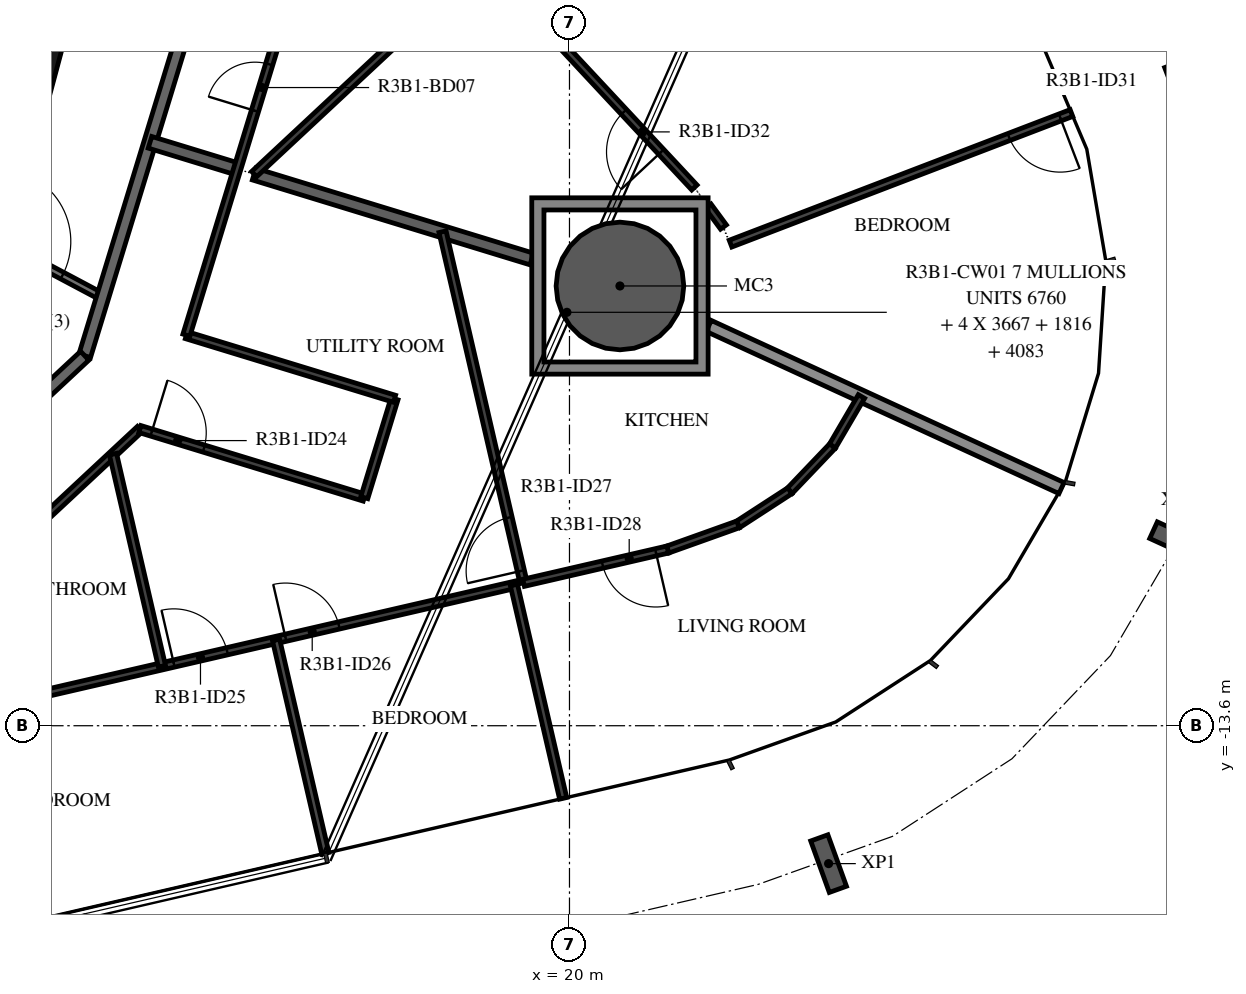
"""IFC4 building model, lengths in metres.
Left out: names, types, materials, properties, quantities, classifications, styles, units other than length and angle.
Written with IfcOpenShell. Run it as: python <this file> out.ifc"""

import sys

from ifc_helpers import new_model, si_unit, direction, frame, frame_2d, origin, origin_2d, place, context, subcontext, project, spatial, polyline, rectangle, hollow_circle, i_section, outline, extrude, element, fill, save


model = new_model("IFC4")
c1 = context("Model", 3, precision=1e-05, world=origin(), true_north=direction((0.0, 1.0)))
c2 = subcontext(c1, "Body", "Model", "MODEL_VIEW")
j1 = project(units=[si_unit("LENGTHUNIT", "METRE"), si_unit("PLANEANGLEUNIT", "RADIAN")], contexts=[c1])
p1 = place(None, origin())
s1 = spatial("IfcSite", under=j1, at=p1, CompositionType="ELEMENT")
p2 = place(p1, origin())
s2 = spatial("IfcBuilding", under=s1, at=p2, CompositionType="ELEMENT")
p3 = place(p2, frame((0.0, 0.0, 123.9)))
s3 = spatial("IfcBuildingStorey", under=s2, at=p3, CompositionType="ELEMENT", Elevation=123.9)
p4 = place(p3, frame((20.83, -6.368, -0.38), z_axis=(0.0, 0.0, 1.0), x_axis=(1.0, 0.0, 0.0)))
e1 = element("IfcColumn", 1, at=p4, inside=s3, PredefinedType="COLUMN", context=c2, shape_type="SweptSolid", body=[
    extrude(hollow_circle(Radius=1.05, WallThickness=0.05, at=origin_2d()), origin(), (0.0, 0.0, 1.0), 3.5),
])
for number, where, z_axis, x_axis in (
    (2, (24.261, -15.868, -0.38), (0.0, 0.0, 1.0), (-0.941, -0.34, 0.0)),
    (3, (30.014, -10.571, -0.38), (0.0, 0.0, 1.0), (-0.416, -0.909, 0.0)),
    (4, (30.262, -2.756, -0.38), (0.0, 0.0, 1.0), (0.358, -0.934, 0.0)),
):
    element("IfcColumn", number, at=place(p3, frame(where, z_axis=z_axis, x_axis=x_axis)), inside=s3, PredefinedType="COLUMN", context=c2, shape_type="SweptSolid", body=[
        extrude(i_section(OverallWidth=0.3, OverallDepth=0.9, WebThickness=0.019, FlangeThickness=0.035, FilletRadius=0.03, at=origin_2d()), origin(), (0.0, 0.0, 1.0), 3.5),
    ])
p5 = place(p3, frame((10.858, -4.479, 0.0), z_axis=(0.0, 0.0, 1.0), x_axis=(0.258734743916, 0.965948410781, 0.0)))
e5 = element("IfcWall", 5, at=p5, inside=s3, PredefinedType="SHEAR", context=c2, shape_type="SweptSolid", body=[
    extrude(rectangle(XDim=3.033, YDim=0.5, at=frame_2d((1.516, 0.0))), origin(), (0.0, 0.0, 1.0), 3.12),
])
p6 = place(p3, frame((10.511, -5.589, 0.0), z_axis=(0.0, 0.0, 1.0), x_axis=(0.882987820808, -0.469395897196, 0.0)))
e6 = element("IfcWall", 6, at=p6, inside=s3, PredefinedType="PARTITIONING", context=c2, shape_type="SweptSolid", body=[
    extrude(rectangle(XDim=2.052, YDim=0.12, at=frame_2d((1.026, 0.0))), origin(), (0.0, 0.0, 1.0), 3.12),
])
p7 = place(p6, frame((0.1, 0.0, 0.0)))
e7 = element("IfcOpeningElement", 7, at=p7, cuts=e6, PredefinedType="OPENING", context=c2, shape_type="SweptSolid", body=[
    extrude(rectangle(XDim=1.2, YDim=2.1, at=frame_2d((0.6, 1.05))), frame((0.0, 0.07, 0.0), z_axis=(0.0, -1.0, 0.0), x_axis=(1.0, 0.0, 0.0)), (0.0, 0.0, 1.0), 0.14),
])
p8 = place(p3, frame((12.028, -7.516, 0.0), z_axis=(0.0, 0.0, 1.0), x_axis=(0.292365533182, 0.956306642771, 0.0)))
e8 = element("IfcWall", 8, at=p8, inside=s3, PredefinedType="STANDARD", context=c2, shape_type="SweptSolid", body=[
    extrude(rectangle(XDim=7.342, YDim=0.2, at=frame_2d((3.671, 0.0))), origin(), (0.0, 0.0, 1.0), 3.12),
])
p9 = place(p3, frame((6.659, -12.523, 0.0), z_axis=(0.0, 0.0, 1.0), x_axis=(0.731350455479, 0.682001841105, 0.0)))
e9 = element("IfcWall", 9, at=p9, inside=s3, PredefinedType="STANDARD", context=c2, shape_type="SweptSolid", body=[
    extrude(rectangle(XDim=7.342, YDim=0.2, at=frame_2d((3.671, 0.0))), origin(), (0.0, 0.0, 1.0), 3.12),
])
p10 = place(p9, frame((0.597, 0.0, 0.0)))
e10 = element("IfcOpeningElement", 10, at=p10, cuts=e9, PredefinedType="OPENING", context=c2, shape_type="SweptSolid", body=[
    extrude(rectangle(XDim=1.0, YDim=2.1, at=frame_2d((0.5, 1.05))), frame((0.0, 0.11, 0.0), z_axis=(0.0, -1.0, 0.0), x_axis=(1.0, 0.0, 0.0)), (0.0, 0.0, 1.0), 0.22),
])
p11 = place(p3, frame((14.536, -4.444, 0.0), z_axis=(0.0, 0.0, 1.0), x_axis=(-0.956326299111, 0.292301230974, 0.0)))
e11 = element("IfcWall", 11, at=p11, inside=s3, PredefinedType="STANDARD", context=c2, shape_type="SweptSolid", body=[
    extrude(rectangle(XDim=1.5, YDim=0.2, at=frame_2d((0.75, 0.0))), origin(), (0.0, 0.0, 1.0), 3.12),
])
p12 = place(p3, frame((19.38, -5.925, 0.0), z_axis=(0.0, 0.0, 1.0), x_axis=(-0.956301542054, 0.29238221674, 0.0)))
e12 = element("IfcWall", 12, at=p12, inside=s3, PredefinedType="STANDARD", context=c2, shape_type="SweptSolid", body=[
    extrude(rectangle(XDim=4.775, YDim=0.2, at=frame_2d((2.387, 0.0))), origin(), (0.0, 0.0, 1.0), 3.12),
])
p13 = place(p3, frame((28.092, -9.692, 0.0), z_axis=(0.0, 0.0, 1.0), x_axis=(-0.908656456134, 0.417544542206, 0.0)))
e13 = element("IfcWall", 13, at=p13, inside=s3, PredefinedType="STANDARD", context=c2, shape_type="SweptSolid", body=[
    extrude(rectangle(XDim=6.385, YDim=0.2, at=frame_2d((3.192, 0.0))), origin(), (0.0, 0.0, 1.0), 2.73),
])
p14 = place(p3, frame((-13.939, -18.911, 0.0), z_axis=(0.0, 0.0, 1.0), x_axis=(0.974369607456, 0.224953035245, 0.0)))
e14 = element("IfcWall", 14, at=p14, inside=s3, PredefinedType="PARTITIONING", context=c2, shape_type="SweptSolid", body=[
    extrude(rectangle(XDim=33.934, YDim=0.12, at=frame_2d((16.967, 0.0))), origin(), (0.0, 0.0, 1.0), 3.12),
])
p15 = place(p14, frame((2.0, 0.0, 0.0)))
e15 = element("IfcOpeningElement", 15, at=p15, cuts=e14, PredefinedType="OPENING", context=c2, shape_type="SweptSolid", body=[
    extrude(rectangle(XDim=0.9, YDim=2.1, at=frame_2d((0.45, 1.05))), frame((0.0, 0.07, 0.0), z_axis=(0.0, -1.0, 0.0), x_axis=(1.0, 0.0, 0.0)), (0.0, 0.0, 1.0), 0.14),
])
p16 = place(p14, frame((28.154, 0.0, 0.0)))
e16 = element("IfcOpeningElement", 16, at=p16, cuts=e14, PredefinedType="OPENING", context=c2, shape_type="SweptSolid", body=[
    extrude(rectangle(XDim=0.9, YDim=2.1, at=frame_2d((0.45, 1.05))), frame((0.0, 0.07, 0.0), z_axis=(0.0, -1.0, 0.0), x_axis=(1.0, 0.0, 0.0)), (0.0, 0.0, 1.0), 0.14),
])
p17 = place(p14, frame((30.039, 0.0, 0.0)))
e17 = element("IfcOpeningElement", 17, at=p17, cuts=e14, PredefinedType="OPENING", context=c2, shape_type="SweptSolid", body=[
    extrude(rectangle(XDim=0.9, YDim=2.1, at=frame_2d((0.45, 1.05))), frame((0.0, 0.07, 0.0), z_axis=(0.0, -1.0, 0.0), x_axis=(1.0, 0.0, 0.0)), (0.0, 0.0, 1.0), 0.14),
])
p18 = place(p3, frame((7.388, -13.894, 0.0), z_axis=(0.0, 0.0, 1.0), x_axis=(0.731346321845, 0.682006273815, 0.0)))
e18 = element("IfcWall", 18, at=p18, inside=s3, PredefinedType="PARTITIONING", context=c2, shape_type="SweptSolid", body=[
    extrude(rectangle(XDim=7.585, YDim=0.12, at=frame_2d((3.793, 0.0))), origin(), (0.0, 0.0, 1.0), 3.12),
])
p19 = place(p18, frame((1.3, 0.0, 0.0)))
e19 = element("IfcOpeningElement", 19, at=p19, cuts=e18, PredefinedType="OPENING", context=c2, shape_type="SweptSolid", body=[
    extrude(rectangle(XDim=0.8, YDim=2.1, at=frame_2d((0.4, 1.05))), frame((0.0, 0.07, 0.0), z_axis=(0.0, -1.0, 0.0), x_axis=(1.0, 0.0, 0.0)), (0.0, 0.0, 1.0), 0.14),
])
p20 = place(p3, frame((12.935, -8.721, 0.0), z_axis=(0.0, 0.0, 1.0), x_axis=(0.956306865441, -0.292364804843, 0.0)))
e20 = element("IfcWall", 20, at=p20, inside=s3, PredefinedType="PARTITIONING", context=c2, shape_type="SweptSolid", body=[
    extrude(rectangle(XDim=3.859, YDim=0.12, at=frame_2d((1.929, 0.0))), origin(), (0.0, 0.0, 1.0), 3.12),
])
p21 = place(p20, frame((0.2, 0.0, 0.0)))
e21 = element("IfcOpeningElement", 21, at=p21, cuts=e20, PredefinedType="OPENING", context=c2, shape_type="SweptSolid", body=[
    extrude(rectangle(XDim=0.9, YDim=2.1, at=frame_2d((0.45, 1.05))), frame((0.0, 0.07, 0.0), z_axis=(0.0, -1.0, 0.0), x_axis=(1.0, 0.0, 0.0)), (0.0, 0.0, 1.0), 0.14),
])
p22 = place(p3, frame((16.625, -9.849, 0.0), z_axis=(0.0, 0.0, 1.0), x_axis=(0.292390011609, 0.956299158795, 0.0)))
e22 = element("IfcWall", 22, at=p22, inside=s3, PredefinedType="PARTITIONING", context=c2, shape_type="SweptSolid", body=[
    extrude(rectangle(XDim=1.7, YDim=0.12, at=frame_2d((0.85, 0.0))), origin(), (0.0, 0.0, 1.0), 3.12),
])
p23 = place(p3, frame((17.123, -8.223, 0.0), z_axis=(0.0, 0.0, 1.0), x_axis=(-0.956299657224, 0.292388381428, 0.0)))
e23 = element("IfcWall", 23, at=p23, inside=s3, PredefinedType="PARTITIONING", context=c2, shape_type="SweptSolid", body=[
    extrude(rectangle(XDim=3.579, YDim=0.12, at=frame_2d((1.79, 0.0))), origin(), (0.0, 0.0, 1.0), 3.12),
])
p24 = place(p3, frame((13.7, -7.177, 0.0), z_axis=(0.0, 0.0, 1.0), x_axis=(0.292382309758, 0.956301513614, 0.0)))
e24 = element("IfcWall", 24, at=p24, inside=s3, PredefinedType="PARTITIONING", context=c2, shape_type="SweptSolid", body=[
    extrude(rectangle(XDim=6.93, YDim=0.12, at=frame_2d((3.465, 0.0))), origin(), (0.0, 0.0, 1.0), 3.12),
])
p25 = place(p24, frame((3.858, 0.0, 0.0)))
e25 = element("IfcOpeningElement", 25, at=p25, cuts=e24, PredefinedType="OPENING", context=c2, shape_type="SweptSolid", body=[
    extrude(rectangle(XDim=0.8, YDim=2.1, at=frame_2d((0.4, 1.05))), frame((0.0, 0.07, 0.0), z_axis=(0.0, -1.0, 0.0), x_axis=(1.0, 0.0, 0.0)), (0.0, 0.0, 1.0), 0.14),
])
p26 = place(p3, frame((15.985, -15.698, 0.0), z_axis=(0.0, 0.0, 1.0), x_axis=(-0.224943703639, 0.9743717618, 0.0)))
e26 = element("IfcWall", 26, at=p26, inside=s3, PredefinedType="PARTITIONING", context=c2, shape_type="SweptSolid", body=[
    extrude(rectangle(XDim=3.6, YDim=0.12, at=frame_2d((1.8, 0.0))), origin(), (0.0, 0.0, 1.0), 2.73),
])
p27 = place(p3, frame((13.298, -12.623, 0.0), z_axis=(0.0, 0.0, 1.0), x_axis=(-0.22499394936, 0.974360160696, 0.0)))
e27 = element("IfcWall", 27, at=p27, inside=s3, PredefinedType="PARTITIONING", context=c2, shape_type="SweptSolid", body=[
    extrude(rectangle(XDim=3.581, YDim=0.12, at=frame_2d((1.791, 0.0))), origin(), (0.0, 0.0, 1.0), 3.12),
])
p28 = place(p3, frame((19.896, -14.794, 0.0), z_axis=(0.0, 0.0, 1.0), x_axis=(-0.224958568294, 0.974368330023, 0.0)))
e28 = element("IfcWall", 28, at=p28, inside=s3, PredefinedType="PARTITIONING", context=c2, shape_type="SweptSolid", body=[
    extrude(rectangle(XDim=3.6, YDim=0.12, at=frame_2d((1.8, 0.0))), origin(), (0.0, 0.0, 1.0), 3.12),
])
p29 = place(p3, frame((19.245, -11.25, 0.0), z_axis=(0.0, 0.0, 1.0), x_axis=(-0.224958805164, 0.974368275335, 0.0)))
e29 = element("IfcWall", 29, at=p29, inside=s3, PredefinedType="PARTITIONING", context=c2, shape_type="SweptSolid", body=[
    extrude(rectangle(XDim=5.926, YDim=0.12, at=frame_2d((2.963, 0.0))), origin(), (0.0, 0.0, 1.0), 3.12),
])
p30 = place(p29, frame((0.2, 0.0, 0.0)))
e30 = element("IfcOpeningElement", 30, at=p30, cuts=e29, PredefinedType="OPENING", context=c2, shape_type="SweptSolid", body=[
    extrude(rectangle(XDim=0.9, YDim=2.1, at=frame_2d((0.45, 1.05))), frame((0.0, 0.07, 0.0), z_axis=(0.0, -1.0, 0.0), x_axis=(1.0, 0.0, 0.0)), (0.0, 0.0, 1.0), 0.14),
])
p31 = place(p3, frame((24.802, -8.186, 0.0), z_axis=(0.0, 0.0, 1.0), x_axis=(-0.505043103481, -0.863094122113, 0.0)))
e31 = element("IfcWall", 31, at=p31, inside=s3, PredefinedType="PARTITIONING", context=c2, shape_type="SweptSolid", body=[
    extrude(rectangle(XDim=0.945, YDim=0.12, at=frame_2d((0.473, 0.0))), origin(), (0.0, 0.0, 1.0), 3.12),
])
for number, where, z_axis, x_axis in (
    (32, (24.324, -9.002, 0.0), (0.0, 0.0, 1.0), (-0.69, -0.723, 0.0)),
    (33, (23.623, -9.737, 0.0), (0.0, 0.0, 1.0), (-0.839, -0.545, 0.0)),
):
    element("IfcWall", number, at=place(p3, frame(where, z_axis=z_axis, x_axis=x_axis)), inside=s3, PredefinedType="PARTITIONING", context=c2, shape_type="SweptSolid", body=[
        extrude(rectangle(XDim=1.016, YDim=0.12, at=frame_2d((0.508, 0.0))), origin(), (0.0, 0.0, 1.0), 3.12),
    ])
p32 = place(p3, frame((22.771, -10.29, 0.0), z_axis=(0.0, 0.0, 1.0), x_axis=(-0.941701391526, -0.336449831623, 0.0)))
e34 = element("IfcWall", 34, at=p32, inside=s3, PredefinedType="PARTITIONING", context=c2, shape_type="SweptSolid", body=[
    extrude(rectangle(XDim=1.227, YDim=0.12, at=frame_2d((0.614, 0.0))), origin(), (0.0, 0.0, 1.0), 3.12),
])
p33 = place(p3, frame((21.615, -10.703, 0.0), z_axis=(0.0, 0.0, 1.0), x_axis=(-0.974359049184, -0.224998762825, 0.0)))
e35 = element("IfcWall", 35, at=p33, inside=s3, PredefinedType="PARTITIONING", context=c2, shape_type="SweptSolid", body=[
    extrude(rectangle(XDim=2.433, YDim=0.12, at=frame_2d((1.216, 0.0))), origin(), (0.0, 0.0, 1.0), 3.12),
])
p34 = place(p33, frame((0.2, 0.0, 0.0)))
e36 = element("IfcOpeningElement", 36, at=p34, cuts=e35, PredefinedType="OPENING", context=c2, shape_type="SweptSolid", body=[
    extrude(rectangle(XDim=0.9, YDim=2.1, at=frame_2d((0.45, 1.05))), frame((0.0, 0.07, 0.0), z_axis=(0.0, -1.0, 0.0), x_axis=(1.0, 0.0, 0.0)), (0.0, 0.0, 1.0), 0.14),
])
p35 = place(p3, frame((28.255, -3.525, 0.0), z_axis=(0.0, 0.0, 1.0), x_axis=(-0.933839412031, -0.357692539114, 0.0)))
e37 = element("IfcWall", 37, at=p35, inside=s3, PredefinedType="PARTITIONING", context=c2, shape_type="SweptSolid", body=[
    extrude(rectangle(XDim=6.004, YDim=0.12, at=frame_2d((3.002, 0.0))), origin(), (0.0, 0.0, 1.0), 2.73),
])
p36 = place(p35, frame((0.2, 0.0, 0.0)))
e38 = element("IfcOpeningElement", 38, at=p36, cuts=e37, PredefinedType="OPENING", context=c2, shape_type="SweptSolid", body=[
    extrude(rectangle(XDim=0.9, YDim=2.1, at=frame_2d((0.45, 1.05))), frame((0.0, 0.07, 0.0), z_axis=(0.0, -1.0, 0.0), x_axis=(1.0, 0.0, 0.0)), (0.0, 0.0, 1.0), 0.14),
])
p37 = place(p3, frame((22.532, -5.399, 0.0), z_axis=(0.0, 0.0, 1.0), x_axis=(-0.592456078431, 0.805602752683, 0.0)))
e39 = element("IfcWall", 39, at=p37, inside=s3, PredefinedType="PARTITIONING", context=c2, shape_type="SweptSolid", body=[
    extrude(rectangle(XDim=0.426, YDim=0.12, at=frame_2d((0.213, 0.0))), origin(), (0.0, 0.0, 1.0), 3.12),
])
p38 = place(p3, frame((18.577, -1.02, 0.0), z_axis=(0.0, 0.0, 1.0), x_axis=(-0.731348673524, -0.682003751994, 0.0)))
e40 = element("IfcWall", 40, at=p38, inside=s3, PredefinedType="PARTITIONING", context=c2, shape_type="SweptSolid", body=[
    extrude(rectangle(XDim=5.146, YDim=0.12, at=frame_2d((2.573, 0.0))), origin(), (0.0, 0.0, 1.0), 3.12),
])
p39 = place(p3, frame((22.054, -4.749, 0.0), z_axis=(0.0, 0.0, 1.0), x_axis=(-0.682014558945, 0.731338595582, 0.0)))
e41 = element("IfcWall", 41, at=p39, inside=s3, PredefinedType="PARTITIONING", context=c2, shape_type="SweptSolid", body=[
    extrude(rectangle(XDim=10.399, YDim=0.12, at=frame_2d((5.2, 0.0))), origin(), (0.0, 0.0, 1.0), 3.12),
])
p40 = place(p39, frame((0.8, 0.0, 0.0)))
e42 = element("IfcOpeningElement", 42, at=p40, cuts=e41, PredefinedType="OPENING", context=c2, shape_type="SweptSolid", body=[
    extrude(rectangle(XDim=0.9, YDim=2.1, at=frame_2d((0.45, 1.05))), frame((0.0, 0.07, 0.0), z_axis=(0.0, -1.0, 0.0), x_axis=(1.0, 0.0, 0.0)), (0.0, 0.0, 1.0), 0.14),
])
p41 = place(p3, origin())
e43 = element("IfcWall", 43, at=p41, inside=s3, PredefinedType="STANDARD", context=c2, shape_type="SweptSolid", body=[
    extrude(outline(polyline([(22.28, -4.918), (22.28, -7.818), (19.38, -7.818), (19.38, -4.918), (22.28, -4.918)]), holes=[polyline([(19.58, -7.618), (22.08, -7.618), (22.08, -5.118), (19.58, -5.118), (19.58, -7.618)])]), origin(), (0.0, 0.0, 1.0), 3.12),
])
p42 = place(p21, origin())
e44 = element("IfcDoor", 44, at=p42, inside=s3, OperationType="SINGLE_SWING_RIGHT", PredefinedType="DOOR", context=c2, shape_type="SweptSolid", body=[
    extrude(rectangle(XDim=0.9, YDim=2.1, at=frame_2d((0.45, 1.05))), frame((0.0, 0.025, 0.0), z_axis=(0.0, -1.0, 0.0), x_axis=(1.0, 0.0, 0.0)), (0.0, 0.0, 1.0), 0.05),
])
fill(e21, e44)
p43 = place(p16, origin())
e45 = element("IfcDoor", 45, at=p43, inside=s3, OperationType="SINGLE_SWING_RIGHT", PredefinedType="DOOR", context=c2, shape_type="SweptSolid", body=[
    extrude(rectangle(XDim=0.9, YDim=2.1, at=frame_2d((0.45, 1.05))), frame((0.0, 0.025, 0.0), z_axis=(0.0, -1.0, 0.0), x_axis=(1.0, 0.0, 0.0)), (0.0, 0.0, 1.0), 0.05),
])
fill(e16, e45)
p44 = place(p17, origin())
e46 = element("IfcDoor", 46, at=p44, inside=s3, OperationType="SINGLE_SWING_RIGHT", PredefinedType="DOOR", context=c2, shape_type="SweptSolid", body=[
    extrude(rectangle(XDim=0.9, YDim=2.1, at=frame_2d((0.45, 1.05))), frame((0.0, 0.025, 0.0), z_axis=(0.0, -1.0, 0.0), x_axis=(1.0, 0.0, 0.0)), (0.0, 0.0, 1.0), 0.05),
])
fill(e17, e46)
p45 = place(p30, origin())
e47 = element("IfcDoor", 47, at=p45, inside=s3, OperationType="SINGLE_SWING_RIGHT", PredefinedType="DOOR", context=c2, shape_type="SweptSolid", body=[
    extrude(rectangle(XDim=0.9, YDim=2.1, at=frame_2d((0.45, 1.05))), frame((0.0, 0.025, 0.0), z_axis=(0.0, -1.0, 0.0), x_axis=(1.0, 0.0, 0.0)), (0.0, 0.0, 1.0), 0.05),
])
fill(e30, e47)
p46 = place(p34, origin())
e48 = element("IfcDoor", 48, at=p46, inside=s3, OperationType="SINGLE_SWING_RIGHT", PredefinedType="DOOR", context=c2, shape_type="SweptSolid", body=[
    extrude(rectangle(XDim=0.9, YDim=2.1, at=frame_2d((0.45, 1.05))), frame((0.0, 0.025, 0.0), z_axis=(0.0, -1.0, 0.0), x_axis=(1.0, 0.0, 0.0)), (0.0, 0.0, 1.0), 0.05),
])
fill(e36, e48)
p47 = place(p25, origin())
e49 = element("IfcDoor", 49, at=p47, inside=s3, OperationType="SINGLE_SWING_LEFT", PredefinedType="DOOR", context=c2, shape_type="SweptSolid", body=[
    extrude(rectangle(XDim=0.8, YDim=2.1, at=frame_2d((0.4, 1.05))), frame((0.0, 0.025, 0.0), z_axis=(0.0, -1.0, 0.0), x_axis=(1.0, 0.0, 0.0)), (0.0, 0.0, 1.0), 0.05),
])
fill(e25, e49)
p48 = place(p36, origin())
e50 = element("IfcDoor", 50, at=p48, inside=s3, OperationType="SINGLE_SWING_LEFT", PredefinedType="DOOR", context=c2, shape_type="SweptSolid", body=[
    extrude(rectangle(XDim=0.9, YDim=2.1, at=frame_2d((0.45, 1.05))), frame((0.0, 0.025, 0.0), z_axis=(0.0, -1.0, 0.0), x_axis=(1.0, 0.0, 0.0)), (0.0, 0.0, 1.0), 0.05),
])
fill(e38, e50)
p49 = place(p40, origin())
e51 = element("IfcDoor", 51, at=p49, inside=s3, OperationType="SINGLE_SWING_RIGHT", PredefinedType="DOOR", context=c2, shape_type="SweptSolid", body=[
    extrude(rectangle(XDim=0.9, YDim=2.1, at=frame_2d((0.45, 1.05))), frame((0.0, 0.025, 0.0), z_axis=(0.0, -1.0, 0.0), x_axis=(1.0, 0.0, 0.0)), (0.0, 0.0, 1.0), 0.05),
])
fill(e42, e51)
p50 = place(p7, origin())
e52 = element("IfcDoor", 52, at=p50, inside=s3, OperationType="DOUBLE_DOOR_SINGLE_SWING", PredefinedType="DOOR", context=c2, shape_type="SweptSolid", body=[
    extrude(rectangle(XDim=1.2, YDim=2.1, at=frame_2d((0.6, 1.05))), frame((0.0, 0.025, 0.0), z_axis=(0.0, -1.0, 0.0), x_axis=(1.0, 0.0, 0.0)), (0.0, 0.0, 1.0), 0.05),
])
fill(e7, e52)
save(model, sys.argv[1])
